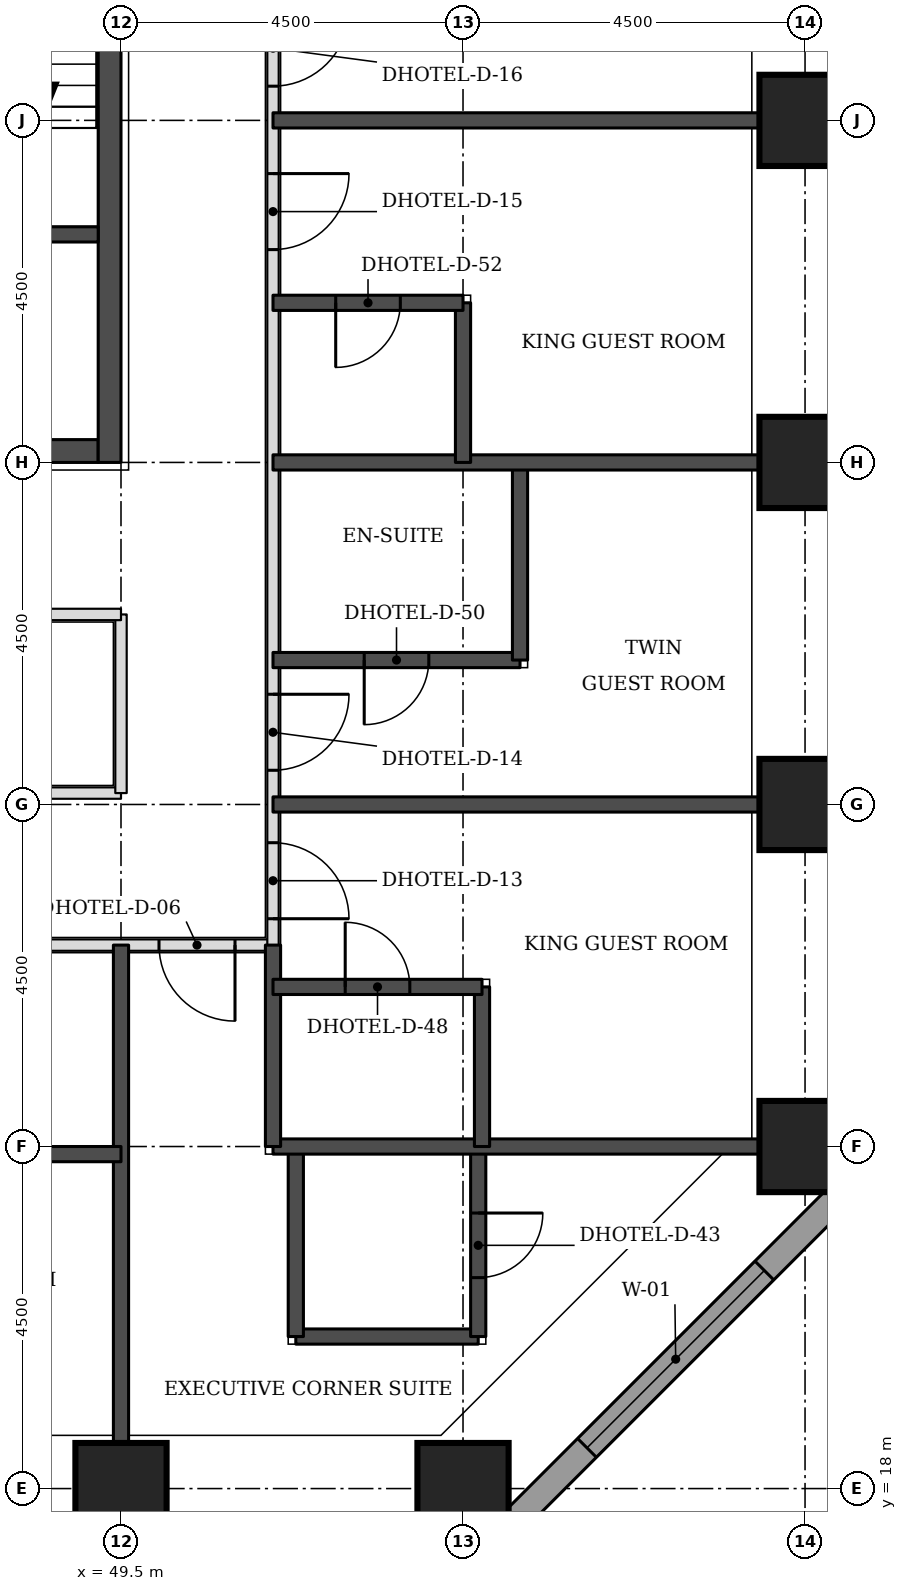
"""IFC4 building model, lengths in metres.
Left out: names, types, materials, properties, quantities, classifications, styles, units other than length and angle.
Written with IfcOpenShell. Run it as: python <this file> out.ifc"""

import sys

from ifc_helpers import new_model, si_unit, direction, frame, frame_2d, origin, origin_2d, place, context, subcontext, project, spatial, rectangle, extrude, element, fill, save


model = new_model("IFC4")
c1 = context("Model", 3, precision=1e-05, world=origin(), true_north=direction((0.0, 1.0)))
c2 = subcontext(c1, "Body", "Model", "MODEL_VIEW")
j1 = project(units=[si_unit("LENGTHUNIT", "METRE"), si_unit("PLANEANGLEUNIT", "RADIAN")], contexts=[c1])
p1 = place(None, origin())
s1 = spatial("IfcSite", under=j1, at=p1, CompositionType="ELEMENT")
p2 = place(p1, origin())
s2 = spatial("IfcBuilding", under=s1, at=p2, CompositionType="ELEMENT")
p3 = place(p2, frame((0.0, 0.0, 36.3)))
s3 = spatial("IfcBuildingStorey", under=s2, at=p3, CompositionType="ELEMENT", Elevation=36.3)
for number, where, z_axis, x_axis in (
    (1, (49.5, 18.0, 0.0), (0.0, 0.0, 1.0), (1.0, 0.0, 0.0)),
    (2, (54.0, 18.0, 0.0), (0.0, 0.0, 1.0), (1.0, 0.0, 0.0)),
    (3, (58.5, 22.5, 0.0), (0.0, 0.0, 1.0), (1.0, 0.0, 0.0)),
    (4, (58.5, 27.0, 0.0), (0.0, 0.0, 1.0), (1.0, 0.0, 0.0)),
    (5, (58.5, 31.5, 0.0), (0.0, 0.0, 1.0), (1.0, 0.0, 0.0)),
    (6, (58.5, 36.0, 0.0), (0.0, 0.0, 1.0), (1.0, 0.0, 0.0)),
):
    element("IfcColumn", number, at=place(p3, frame(where, z_axis=z_axis, x_axis=x_axis)), inside=s3, PredefinedType="COLUMN", context=c2, shape_type="SweptSolid", body=[
        extrude(rectangle(XDim=1.2, YDim=1.2, at=origin_2d()), origin(), (0.0, 0.0, 1.0), 3.3),
    ])
p4 = place(p3, frame((40.8, 31.65, 0.0), z_axis=(0.0, 0.0, 1.0), x_axis=(1.0, 0.0, 0.0)))
e7 = element("IfcWall", 7, at=p4, inside=s3, PredefinedType="SHEAR", context=c2, shape_type="SweptSolid", body=[
    extrude(rectangle(XDim=8.4, YDim=0.3, at=frame_2d((4.2, 0.0))), origin(), (0.0, 0.0, 1.0), 3.3),
])
p5 = place(p4, frame((5.2, 0.0, 0.0)))
e8 = element("IfcOpeningElement", 8, at=p5, cuts=e7, PredefinedType="OPENING", context=c2, shape_type="SweptSolid", body=[
    extrude(rectangle(XDim=1.0, YDim=2.1, at=frame_2d((0.5, 1.05))), frame((0.0, 0.16, 0.0), z_axis=(0.0, -1.0, 0.0), x_axis=(1.0, 0.0, 0.0)), (0.0, 0.0, 1.0), 0.32),
])
p6 = place(p3, frame((49.35, 31.5, 0.0), z_axis=(0.0, 0.0, 1.0), x_axis=(0.0, 1.0, 0.0)))
e9 = element("IfcWall", 9, at=p6, inside=s3, PredefinedType="SHEAR", context=c2, shape_type="SweptSolid", body=[
    extrude(rectangle(XDim=9.0, YDim=0.3, at=frame_2d((4.5, 0.0))), origin(), (0.0, 0.0, 1.0), 3.3),
])
p7 = place(p3, frame((54.27, 17.174, 0.0), z_axis=(0.0, 0.0, 1.0), x_axis=(0.707106781187, 0.707106781187, 0.0)))
e10 = element("IfcWall", 10, at=p7, inside=s3, PredefinedType="STANDARD", context=c2, shape_type="SweptSolid", body=[
    extrude(rectangle(XDim=7.151, YDim=0.35, at=frame_2d((3.576, 0.0))), origin(), (0.0, 0.0, 1.0), 3.055),
])
p8 = place(p7, frame((1.926, 0.0, 0.8)))
e11 = element("IfcOpeningElement", 11, at=p8, cuts=e10, PredefinedType="OPENING", context=c2, shape_type="SweptSolid", body=[
    extrude(rectangle(XDim=3.3, YDim=1.5, at=frame_2d((1.65, 0.75))), frame((0.0, 0.185, 0.0), z_axis=(0.0, -1.0, 0.0), x_axis=(1.0, 0.0, 0.0)), (0.0, 0.0, 1.0), 0.37),
])
p9 = place(p3, frame((19.15, 25.15, 0.0), z_axis=(0.0, 0.0, 1.0), x_axis=(1.0, 0.0, 0.0)))
e12 = element("IfcWall", 12, at=p9, inside=s3, PredefinedType="PARTITIONING", context=c2, shape_type="SweptSolid", body=[
    extrude(rectangle(XDim=32.35, YDim=0.15, at=frame_2d((16.175, 0.0))), origin(), (0.0, 0.0, 1.0), 3.08),
])
p10 = place(p9, frame((6.4, 0.0, 0.0)))
e13 = element("IfcOpeningElement", 13, at=p10, cuts=e12, PredefinedType="OPENING", context=c2, shape_type="SweptSolid", body=[
    extrude(rectangle(XDim=1.0, YDim=2.1, at=frame_2d((0.5, 1.05))), frame((0.0, 0.085, 0.0), z_axis=(0.0, -1.0, 0.0), x_axis=(1.0, 0.0, 0.0)), (0.0, 0.0, 1.0), 0.17),
])
p11 = place(p9, frame((10.5, 0.0, 0.0)))
e14 = element("IfcOpeningElement", 14, at=p11, cuts=e12, PredefinedType="OPENING", context=c2, shape_type="SweptSolid", body=[
    extrude(rectangle(XDim=1.0, YDim=2.1, at=frame_2d((0.5, 1.05))), frame((0.0, 0.085, 0.0), z_axis=(0.0, -1.0, 0.0), x_axis=(1.0, 0.0, 0.0)), (0.0, 0.0, 1.0), 0.17),
])
p12 = place(p9, frame((22.45, 0.0, 0.0)))
e15 = element("IfcOpeningElement", 15, at=p12, cuts=e12, PredefinedType="OPENING", context=c2, shape_type="SweptSolid", body=[
    extrude(rectangle(XDim=1.0, YDim=2.1, at=frame_2d((0.5, 1.05))), frame((0.0, 0.085, 0.0), z_axis=(0.0, -1.0, 0.0), x_axis=(1.0, 0.0, 0.0)), (0.0, 0.0, 1.0), 0.17),
])
p13 = place(p9, frame((26.55, 0.0, 0.0)))
e16 = element("IfcOpeningElement", 16, at=p13, cuts=e12, PredefinedType="OPENING", context=c2, shape_type="SweptSolid", body=[
    extrude(rectangle(XDim=1.0, YDim=2.1, at=frame_2d((0.5, 1.05))), frame((0.0, 0.085, 0.0), z_axis=(0.0, -1.0, 0.0), x_axis=(1.0, 0.0, 0.0)), (0.0, 0.0, 1.0), 0.17),
])
p14 = place(p9, frame((1.175, 0.0, 0.0)))
e17 = element("IfcOpeningElement", 17, at=p14, cuts=e12, PredefinedType="OPENING", context=c2, shape_type="SweptSolid", body=[
    extrude(rectangle(XDim=1.0, YDim=2.1, at=frame_2d((0.5, 1.05))), frame((0.0, 0.085, 0.0), z_axis=(0.0, -1.0, 0.0), x_axis=(1.0, 0.0, 0.0)), (0.0, 0.0, 1.0), 0.17),
])
p15 = place(p9, frame((30.85, 0.0, 0.0)))
e18 = element("IfcOpeningElement", 18, at=p15, cuts=e12, PredefinedType="OPENING", context=c2, shape_type="SweptSolid", body=[
    extrude(rectangle(XDim=1.0, YDim=2.1, at=frame_2d((0.5, 1.05))), frame((0.0, 0.085, 0.0), z_axis=(0.0, -1.0, 0.0), x_axis=(1.0, 0.0, 0.0)), (0.0, 0.0, 1.0), 0.17),
])
p16 = place(p3, frame((51.5, 25.15, 0.0), z_axis=(0.0, 0.0, 1.0), x_axis=(0.0, 1.0, 0.0)))
e19 = element("IfcWall", 19, at=p16, inside=s3, PredefinedType="PARTITIONING", context=c2, shape_type="SweptSolid", body=[
    extrude(rectangle(XDim=22.35, YDim=0.15, at=frame_2d((11.175, 0.0))), origin(), (0.0, 0.0, 1.0), 3.08),
])
p17 = place(p16, frame((0.347, 0.0, 0.0)))
e20 = element("IfcOpeningElement", 20, at=p17, cuts=e19, PredefinedType="OPENING", context=c2, shape_type="SweptSolid", body=[
    extrude(rectangle(XDim=1.0, YDim=2.1, at=frame_2d((0.5, 1.05))), frame((0.0, 0.085, 0.0), z_axis=(0.0, -1.0, 0.0), x_axis=(1.0, 0.0, 0.0)), (0.0, 0.0, 1.0), 0.17),
])
p18 = place(p16, frame((2.3, 0.0, 0.0)))
e21 = element("IfcOpeningElement", 21, at=p18, cuts=e19, PredefinedType="OPENING", context=c2, shape_type="SweptSolid", body=[
    extrude(rectangle(XDim=1.0, YDim=2.1, at=frame_2d((0.5, 1.05))), frame((0.0, 0.085, 0.0), z_axis=(0.0, -1.0, 0.0), x_axis=(1.0, 0.0, 0.0)), (0.0, 0.0, 1.0), 0.17),
])
p19 = place(p16, frame((9.15, 0.0, 0.0)))
e22 = element("IfcOpeningElement", 22, at=p19, cuts=e19, PredefinedType="OPENING", context=c2, shape_type="SweptSolid", body=[
    extrude(rectangle(XDim=1.0, YDim=2.1, at=frame_2d((0.5, 1.05))), frame((0.0, 0.085, 0.0), z_axis=(0.0, -1.0, 0.0), x_axis=(1.0, 0.0, 0.0)), (0.0, 0.0, 1.0), 0.17),
])
p20 = place(p16, frame((11.3, 0.0, 0.0)))
e23 = element("IfcOpeningElement", 23, at=p20, cuts=e19, PredefinedType="OPENING", context=c2, shape_type="SweptSolid", body=[
    extrude(rectangle(XDim=1.0, YDim=2.1, at=frame_2d((0.5, 1.05))), frame((0.0, 0.085, 0.0), z_axis=(0.0, -1.0, 0.0), x_axis=(1.0, 0.0, 0.0)), (0.0, 0.0, 1.0), 0.17),
])
p21 = place(p16, frame((18.4, 0.0, 0.0)))
e24 = element("IfcOpeningElement", 24, at=p21, cuts=e19, PredefinedType="OPENING", context=c2, shape_type="SweptSolid", body=[
    extrude(rectangle(XDim=0.9, YDim=2.1, at=frame_2d((0.45, 1.05))), frame((0.0, 0.085, 0.0), z_axis=(0.0, -1.0, 0.0), x_axis=(1.0, 0.0, 0.0)), (0.0, 0.0, 1.0), 0.17),
])
p22 = place(p3, frame((40.5, 27.15, 0.0), z_axis=(0.0, 0.0, 1.0), x_axis=(1.0, 0.0, 0.0)))
e25 = element("IfcWall", 25, at=p22, inside=s3, PredefinedType="PARTITIONING", context=c2, shape_type="SweptSolid", body=[
    extrude(rectangle(XDim=9.0, YDim=0.15, at=frame_2d((4.5, 0.0))), origin(), (0.0, 0.0, 1.0), 3.08),
])
p23 = place(p3, frame((49.5, 27.15, 0.0), z_axis=(0.0, 0.0, 1.0), x_axis=(0.0, 1.0, 0.0)))
e26 = element("IfcWall", 26, at=p23, inside=s3, PredefinedType="PARTITIONING", context=c2, shape_type="SweptSolid", body=[
    extrude(rectangle(XDim=2.35, YDim=0.15, at=frame_2d((1.175, 0.0))), origin(), (0.0, 0.0, 1.0), 3.08),
])
p24 = place(p3, frame((40.5, 29.5, 0.0), z_axis=(0.0, 0.0, 1.0), x_axis=(1.0, 0.0, 0.0)))
e27 = element("IfcWall", 27, at=p24, inside=s3, PredefinedType="PARTITIONING", context=c2, shape_type="SweptSolid", body=[
    extrude(rectangle(XDim=9.0, YDim=0.15, at=frame_2d((4.5, 0.0))), origin(), (0.0, 0.0, 1.0), 3.08),
])
p25 = place(p24, frame((4.05, 0.0, 0.0)))
e28 = element("IfcOpeningElement", 28, at=p25, cuts=e27, PredefinedType="OPENING", context=c2, shape_type="SweptSolid", body=[
    extrude(rectangle(XDim=0.9, YDim=2.1, at=frame_2d((0.45, 1.05))), frame((0.0, 0.085, 0.0), z_axis=(0.0, -1.0, 0.0), x_axis=(1.0, 0.0, 0.0)), (0.0, 0.0, 1.0), 0.17),
])
p26 = place(p3, frame((49.5, 18.6, 0.0), z_axis=(0.0, 0.0, 1.0), x_axis=(0.0, 1.0, 0.0)))
e29 = element("IfcWall", 29, at=p26, inside=s3, PredefinedType="SOLIDWALL", context=c2, shape_type="SweptSolid", body=[
    extrude(rectangle(XDim=6.55, YDim=0.2, at=frame_2d((3.275, 0.0))), origin(), (0.0, 0.0, 1.0), 3.08),
])
p27 = place(p3, frame((51.8, 20.0, 0.0), z_axis=(0.0, 0.0, 1.0), x_axis=(1.0, 0.0, 0.0)))
e30 = element("IfcWall", 30, at=p27, inside=s3, PredefinedType="SOLIDWALL", context=c2, shape_type="SweptSolid", body=[
    extrude(rectangle(XDim=2.4, YDim=0.2, at=frame_2d((1.2, 0.0))), origin(), (0.0, 0.0, 1.0), 3.08),
])
p28 = place(p3, frame((51.8, 20.0, 0.0), z_axis=(0.0, 0.0, 1.0), x_axis=(0.0, 1.0, 0.0)))
e31 = element("IfcWall", 31, at=p28, inside=s3, PredefinedType="SOLIDWALL", context=c2, shape_type="SweptSolid", body=[
    extrude(rectangle(XDim=2.5, YDim=0.2, at=frame_2d((1.25, 0.0))), origin(), (0.0, 0.0, 1.0), 3.08),
])
p29 = place(p3, frame((54.2, 20.0, 0.0), z_axis=(0.0, 0.0, 1.0), x_axis=(0.0, 1.0, 0.0)))
e32 = element("IfcWall", 32, at=p29, inside=s3, PredefinedType="SOLIDWALL", context=c2, shape_type="SweptSolid", body=[
    extrude(rectangle(XDim=2.5, YDim=0.2, at=frame_2d((1.25, 0.0))), origin(), (0.0, 0.0, 1.0), 3.08),
])
p30 = place(p29, frame((0.775, 0.0, 0.0)))
e33 = element("IfcOpeningElement", 33, at=p30, cuts=e32, PredefinedType="OPENING", context=c2, shape_type="SweptSolid", body=[
    extrude(rectangle(XDim=0.85, YDim=2.1, at=frame_2d((0.425, 1.05))), frame((0.0, 0.11, 0.0), z_axis=(0.0, -1.0, 0.0), x_axis=(1.0, 0.0, 0.0)), (0.0, 0.0, 1.0), 0.22),
])
p31 = place(p3, frame((47.4, 22.4, 0.0), z_axis=(0.0, 0.0, 1.0), x_axis=(1.0, 0.0, 0.0)))
e34 = element("IfcWall", 34, at=p31, inside=s3, PredefinedType="SOLIDWALL", context=c2, shape_type="SweptSolid", body=[
    extrude(rectangle(XDim=2.1, YDim=0.2, at=frame_2d((1.05, 0.0))), origin(), (0.0, 0.0, 1.0), 3.08),
])
p32 = place(p3, frame((51.5, 22.5, 0.0), z_axis=(0.0, 0.0, 1.0), x_axis=(1.0, 0.0, 0.0)))
e35 = element("IfcWall", 35, at=p32, inside=s3, PredefinedType="SOLIDWALL", context=c2, shape_type="SweptSolid", body=[
    extrude(rectangle(XDim=6.4, YDim=0.2, at=frame_2d((3.2, 0.0))), origin(), (0.0, 0.0, 1.0), 3.08),
])
p33 = place(p3, frame((51.5, 22.5, 0.0), z_axis=(0.0, 0.0, 1.0), x_axis=(0.0, 1.0, 0.0)))
e36 = element("IfcWall", 36, at=p33, inside=s3, PredefinedType="SOLIDWALL", context=c2, shape_type="SweptSolid", body=[
    extrude(rectangle(XDim=2.65, YDim=0.2, at=frame_2d((1.325, 0.0))), origin(), (0.0, 0.0, 1.0), 3.08),
])
p34 = place(p3, frame((54.25, 22.5, 0.0), z_axis=(0.0, 0.0, 1.0), x_axis=(0.0, 1.0, 0.0)))
e37 = element("IfcWall", 37, at=p34, inside=s3, PredefinedType="SOLIDWALL", context=c2, shape_type="SweptSolid", body=[
    extrude(rectangle(XDim=2.1, YDim=0.2, at=frame_2d((1.05, 0.0))), origin(), (0.0, 0.0, 1.0), 3.08),
])
p35 = place(p3, frame((51.5, 24.6, 0.0), z_axis=(0.0, 0.0, 1.0), x_axis=(1.0, 0.0, 0.0)))
e38 = element("IfcWall", 38, at=p35, inside=s3, PredefinedType="SOLIDWALL", context=c2, shape_type="SweptSolid", body=[
    extrude(rectangle(XDim=2.75, YDim=0.2, at=frame_2d((1.375, 0.0))), origin(), (0.0, 0.0, 1.0), 3.08),
])
p36 = place(p35, frame((0.95, 0.0, 0.0)))
e39 = element("IfcOpeningElement", 39, at=p36, cuts=e38, PredefinedType="OPENING", context=c2, shape_type="SweptSolid", body=[
    extrude(rectangle(XDim=0.85, YDim=2.1, at=frame_2d((0.425, 1.05))), frame((0.0, 0.11, 0.0), z_axis=(0.0, -1.0, 0.0), x_axis=(1.0, 0.0, 0.0)), (0.0, 0.0, 1.0), 0.22),
])
p37 = place(p3, frame((51.5, 27.0, 0.0), z_axis=(0.0, 0.0, 1.0), x_axis=(1.0, 0.0, 0.0)))
e40 = element("IfcWall", 40, at=p37, inside=s3, PredefinedType="SOLIDWALL", context=c2, shape_type="SweptSolid", body=[
    extrude(rectangle(XDim=6.4, YDim=0.2, at=frame_2d((3.2, 0.0))), origin(), (0.0, 0.0, 1.0), 3.08),
])
p38 = place(p3, frame((51.5, 28.9, 0.0), z_axis=(0.0, 0.0, 1.0), x_axis=(1.0, 0.0, 0.0)))
e41 = element("IfcWall", 41, at=p38, inside=s3, PredefinedType="SOLIDWALL", context=c2, shape_type="SweptSolid", body=[
    extrude(rectangle(XDim=3.25, YDim=0.2, at=frame_2d((1.625, 0.0))), origin(), (0.0, 0.0, 1.0), 3.08),
])
p39 = place(p38, frame((1.2, 0.0, 0.0)))
e42 = element("IfcOpeningElement", 42, at=p39, cuts=e41, PredefinedType="OPENING", context=c2, shape_type="SweptSolid", body=[
    extrude(rectangle(XDim=0.85, YDim=2.1, at=frame_2d((0.425, 1.05))), frame((0.0, 0.11, 0.0), z_axis=(0.0, -1.0, 0.0), x_axis=(1.0, 0.0, 0.0)), (0.0, 0.0, 1.0), 0.22),
])
p40 = place(p3, frame((54.75, 28.9, 0.0), z_axis=(0.0, 0.0, 1.0), x_axis=(0.0, 1.0, 0.0)))
e43 = element("IfcWall", 43, at=p40, inside=s3, PredefinedType="SOLIDWALL", context=c2, shape_type="SweptSolid", body=[
    extrude(rectangle(XDim=2.6, YDim=0.2, at=frame_2d((1.3, 0.0))), origin(), (0.0, 0.0, 1.0), 3.08),
])
p41 = place(p3, frame((51.5, 31.5, 0.0), z_axis=(0.0, 0.0, 1.0), x_axis=(1.0, 0.0, 0.0)))
e44 = element("IfcWall", 44, at=p41, inside=s3, PredefinedType="SOLIDWALL", context=c2, shape_type="SweptSolid", body=[
    extrude(rectangle(XDim=6.4, YDim=0.2, at=frame_2d((3.2, 0.0))), origin(), (0.0, 0.0, 1.0), 3.08),
])
p42 = place(p3, frame((54.0, 31.5, 0.0), z_axis=(0.0, 0.0, 1.0), x_axis=(0.0, 1.0, 0.0)))
e45 = element("IfcWall", 45, at=p42, inside=s3, PredefinedType="SOLIDWALL", context=c2, shape_type="SweptSolid", body=[
    extrude(rectangle(XDim=2.1, YDim=0.2, at=frame_2d((1.05, 0.0))), origin(), (0.0, 0.0, 1.0), 3.08),
])
p43 = place(p3, frame((51.5, 33.6, 0.0), z_axis=(0.0, 0.0, 1.0), x_axis=(1.0, 0.0, 0.0)))
e46 = element("IfcWall", 46, at=p43, inside=s3, PredefinedType="SOLIDWALL", context=c2, shape_type="SweptSolid", body=[
    extrude(rectangle(XDim=2.5, YDim=0.2, at=frame_2d((1.25, 0.0))), origin(), (0.0, 0.0, 1.0), 3.08),
])
p44 = place(p43, frame((0.825, 0.0, 0.0)))
e47 = element("IfcOpeningElement", 47, at=p44, cuts=e46, PredefinedType="OPENING", context=c2, shape_type="SweptSolid", body=[
    extrude(rectangle(XDim=0.85, YDim=2.1, at=frame_2d((0.425, 1.05))), frame((0.0, 0.11, 0.0), z_axis=(0.0, -1.0, 0.0), x_axis=(1.0, 0.0, 0.0)), (0.0, 0.0, 1.0), 0.22),
])
p45 = place(p3, frame((51.5, 36.0, 0.0), z_axis=(0.0, 0.0, 1.0), x_axis=(1.0, 0.0, 0.0)))
e48 = element("IfcWall", 48, at=p45, inside=s3, PredefinedType="SOLIDWALL", context=c2, shape_type="SweptSolid", body=[
    extrude(rectangle(XDim=6.4, YDim=0.2, at=frame_2d((3.2, 0.0))), origin(), (0.0, 0.0, 1.0), 3.08),
])
p46 = place(p3, frame((46.2, 34.5, 0.0), z_axis=(0.0, 0.0, 1.0), x_axis=(1.0, 0.0, 0.0)))
e49 = element("IfcWall", 49, at=p46, inside=s3, PredefinedType="SOLIDWALL", context=c2, shape_type="SweptSolid", body=[
    extrude(rectangle(XDim=3.0, YDim=0.2, at=frame_2d((1.5, 0.0))), origin(), (0.0, 0.0, 1.0), 3.08),
])
p47 = place(p8, origin())
e50 = element("IfcWindow", 50, at=p47, inside=s3, PartitioningType="SINGLE_PANEL", PredefinedType="WINDOW", context=c2, shape_type="SweptSolid", body=[
    extrude(rectangle(XDim=3.3, YDim=1.5, at=frame_2d((1.65, 0.75))), frame((0.0, 0.085, 0.0), z_axis=(0.0, -1.0, 0.0), x_axis=(1.0, 0.0, 0.0)), (0.0, 0.0, 1.0), 0.06),
])
fill(e11, e50)
p48 = place(p17, frame((1.0, 0.0, 0.0), z_axis=(0.0, 0.0, 1.0), x_axis=(-1.0, 0.0, 0.0)))
e51 = element("IfcDoor", 51, at=p48, inside=s3, OperationType="SINGLE_SWING_RIGHT", PredefinedType="DOOR", context=c2, shape_type="SweptSolid", body=[
    extrude(rectangle(XDim=1.0, YDim=2.1, at=frame_2d((0.5, 1.05))), frame((0.0, 0.025, 0.0), z_axis=(0.0, -1.0, 0.0), x_axis=(1.0, 0.0, 0.0)), (0.0, 0.0, 1.0), 0.05),
])
fill(e20, e51)
p49 = place(p36, origin())
e52 = element("IfcDoor", 52, at=p49, inside=s3, OperationType="SINGLE_SWING_LEFT", PredefinedType="DOOR", context=c2, shape_type="SweptSolid", body=[
    extrude(rectangle(XDim=0.85, YDim=2.1, at=frame_2d((0.425, 1.05))), frame((0.0, 0.025, 0.0), z_axis=(0.0, -1.0, 0.0), x_axis=(1.0, 0.0, 0.0)), (0.0, 0.0, 1.0), 0.05),
])
fill(e39, e52)
p50 = place(p18, frame((1.0, 0.0, 0.0), z_axis=(0.0, 0.0, 1.0), x_axis=(-1.0, 0.0, 0.0)))
e53 = element("IfcDoor", 53, at=p50, inside=s3, OperationType="SINGLE_SWING_LEFT", PredefinedType="DOOR", context=c2, shape_type="SweptSolid", body=[
    extrude(rectangle(XDim=1.0, YDim=2.1, at=frame_2d((0.5, 1.05))), frame((0.0, 0.025, 0.0), z_axis=(0.0, -1.0, 0.0), x_axis=(1.0, 0.0, 0.0)), (0.0, 0.0, 1.0), 0.05),
])
fill(e21, e53)
p51 = place(p39, frame((0.85, 0.0, 0.0), z_axis=(0.0, 0.0, 1.0), x_axis=(-1.0, 0.0, 0.0)))
e54 = element("IfcDoor", 54, at=p51, inside=s3, OperationType="SINGLE_SWING_RIGHT", PredefinedType="DOOR", context=c2, shape_type="SweptSolid", body=[
    extrude(rectangle(XDim=0.85, YDim=2.1, at=frame_2d((0.425, 1.05))), frame((0.0, 0.025, 0.0), z_axis=(0.0, -1.0, 0.0), x_axis=(1.0, 0.0, 0.0)), (0.0, 0.0, 1.0), 0.05),
])
fill(e42, e54)
p52 = place(p19, frame((1.0, 0.0, 0.0), z_axis=(0.0, 0.0, 1.0), x_axis=(-1.0, 0.0, 0.0)))
e55 = element("IfcDoor", 55, at=p52, inside=s3, OperationType="SINGLE_SWING_LEFT", PredefinedType="DOOR", context=c2, shape_type="SweptSolid", body=[
    extrude(rectangle(XDim=1.0, YDim=2.1, at=frame_2d((0.5, 1.05))), frame((0.0, 0.025, 0.0), z_axis=(0.0, -1.0, 0.0), x_axis=(1.0, 0.0, 0.0)), (0.0, 0.0, 1.0), 0.05),
])
fill(e22, e55)
p53 = place(p44, frame((0.85, 0.0, 0.0), z_axis=(0.0, 0.0, 1.0), x_axis=(-1.0, 0.0, 0.0)))
e56 = element("IfcDoor", 56, at=p53, inside=s3, OperationType="SINGLE_SWING_RIGHT", PredefinedType="DOOR", context=c2, shape_type="SweptSolid", body=[
    extrude(rectangle(XDim=0.85, YDim=2.1, at=frame_2d((0.425, 1.05))), frame((0.0, 0.025, 0.0), z_axis=(0.0, -1.0, 0.0), x_axis=(1.0, 0.0, 0.0)), (0.0, 0.0, 1.0), 0.05),
])
fill(e47, e56)
p54 = place(p20, frame((1.0, 0.0, 0.0), z_axis=(0.0, 0.0, 1.0), x_axis=(-1.0, 0.0, 0.0)))
e57 = element("IfcDoor", 57, at=p54, inside=s3, OperationType="SINGLE_SWING_LEFT", PredefinedType="DOOR", context=c2, shape_type="SweptSolid", body=[
    extrude(rectangle(XDim=1.0, YDim=2.1, at=frame_2d((0.5, 1.05))), frame((0.0, 0.025, 0.0), z_axis=(0.0, -1.0, 0.0), x_axis=(1.0, 0.0, 0.0)), (0.0, 0.0, 1.0), 0.05),
])
fill(e23, e57)
p55 = place(p15, frame((1.0, 0.0, 0.0), z_axis=(0.0, 0.0, 1.0), x_axis=(-1.0, 0.0, 0.0)))
e58 = element("IfcDoor", 58, at=p55, inside=s3, OperationType="SINGLE_SWING_LEFT", PredefinedType="DOOR", context=c2, shape_type="SweptSolid", body=[
    extrude(rectangle(XDim=1.0, YDim=2.1, at=frame_2d((0.5, 1.05))), frame((0.0, 0.025, 0.0), z_axis=(0.0, -1.0, 0.0), x_axis=(1.0, 0.0, 0.0)), (0.0, 0.0, 1.0), 0.05),
])
fill(e18, e58)
p56 = place(p30, frame((0.85, 0.0, 0.0), z_axis=(0.0, 0.0, 1.0), x_axis=(-1.0, 0.0, 0.0)))
e59 = element("IfcDoor", 59, at=p56, inside=s3, OperationType="SINGLE_SWING_LEFT", PredefinedType="DOOR", context=c2, shape_type="SweptSolid", body=[
    extrude(rectangle(XDim=0.85, YDim=2.1, at=frame_2d((0.425, 1.05))), frame((0.0, 0.025, 0.0), z_axis=(0.0, -1.0, 0.0), x_axis=(1.0, 0.0, 0.0)), (0.0, 0.0, 1.0), 0.05),
])
fill(e33, e59)
save(model, sys.argv[1])
